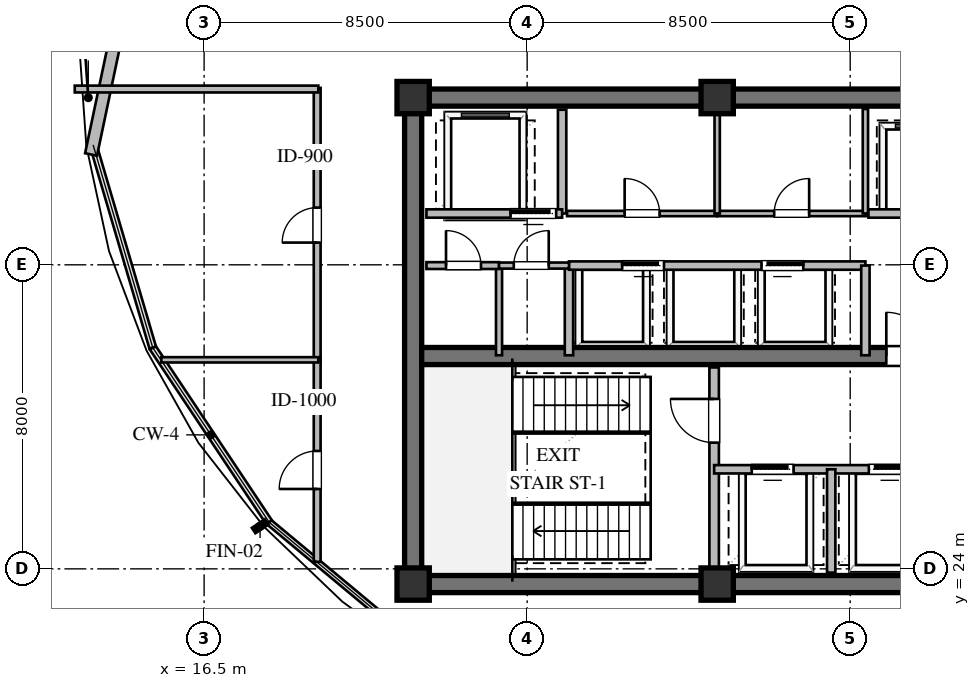
"""IFC4 building model, lengths in metres.
Left out: names, types, materials, properties, quantities, classifications, styles, units other than length and angle.
Written with IfcOpenShell. Run it as: python <this file> out.ifc"""

import sys

from ifc_helpers import new_model, si_unit, direction, frame, frame_2d, origin, origin_2d, place, context, subcontext, project, spatial, rectangle, extrude, element, fill, save


model = new_model("IFC4")
c1 = context("Model", 3, precision=1e-05, world=origin(), true_north=direction((0.0, 1.0)))
c2 = subcontext(c1, "Body", "Model", "MODEL_VIEW")
j1 = project(units=[si_unit("LENGTHUNIT", "METRE"), si_unit("PLANEANGLEUNIT", "RADIAN")], contexts=[c1])
p1 = place(None, origin())
s1 = spatial("IfcSite", under=j1, at=p1, CompositionType="ELEMENT")
p2 = place(p1, origin())
s2 = spatial("IfcBuilding", under=s1, at=p2, CompositionType="ELEMENT")
p3 = place(p2, frame((0.0, 0.0, 190.8)))
s3 = spatial("IfcBuildingStorey", under=s2, at=p3, CompositionType="ELEMENT", Elevation=190.8)
for number, where, z_axis, x_axis in (
    (1, (21.775, 23.6, 0.0), (0.0, 0.0, 1.0), (1.0, 0.0, 0.0)),
    (2, (21.775, 36.4, 0.0), (0.0, 0.0, 1.0), (1.0, 0.0, 0.0)),
):
    element("IfcWall", number, at=place(p3, frame(where, z_axis=z_axis, x_axis=x_axis)), inside=s3, PredefinedType="SHEAR", context=c2, shape_type="SweptSolid", body=[
        extrude(rectangle(XDim=22.45, YDim=0.45, at=frame_2d((11.225, 0.0))), origin(), (0.0, 0.0, 1.0), 4.56),
    ])
p4 = place(p3, frame((22.0, 23.825, 0.0), z_axis=(0.0, 0.0, 1.0), x_axis=(0.0, 1.0, 0.0)))
e3 = element("IfcWall", 3, at=p4, inside=s3, PredefinedType="SHEAR", context=c2, shape_type="SweptSolid", body=[
    extrude(rectangle(XDim=12.35, YDim=0.45, at=frame_2d((6.175, 0.0))), origin(), (0.0, 0.0, 1.0), 4.56),
])
p5 = place(p3, frame((22.225, 29.6, 0.0), z_axis=(0.0, 0.0, 1.0), x_axis=(1.0, 0.0, 0.0)))
e4 = element("IfcWall", 4, at=p5, inside=s3, PredefinedType="SHEAR", context=c2, shape_type="SweptSolid", body=[
    extrude(rectangle(XDim=21.55, YDim=0.45, at=frame_2d((10.775, 0.0))), origin(), (0.0, 0.0, 1.0), 4.56),
])
p6 = place(p5, frame((12.225, 0.0, 0.0)))
e5 = element("IfcOpeningElement", 5, at=p6, cuts=e4, PredefinedType="OPENING", context=c2, shape_type="SweptSolid", body=[
    extrude(rectangle(XDim=1.15, YDim=2.1, at=frame_2d((0.575, 1.05))), frame((0.0, 0.235, 0.0), z_axis=(0.0, -1.0, 0.0), x_axis=(1.0, 0.0, 0.0)), (0.0, 0.0, 1.0), 0.47),
])
for number, where, z_axis, x_axis in (
    (6, (22.0, 23.6, 0.0), (0.0, 0.0, 1.0), (1.0, 0.0, 0.0)),
    (7, (30.0, 23.6, 0.0), (0.0, 0.0, 1.0), (1.0, 0.0, 0.0)),
    (8, (30.0, 36.4, 0.0), (0.0, 0.0, 1.0), (1.0, 0.0, 0.0)),
    (9, (22.0, 36.4, 0.0), (0.0, 0.0, 1.0), (1.0, 0.0, 0.0)),
):
    element("IfcColumn", number, at=place(p3, frame(where, z_axis=z_axis, x_axis=x_axis)), inside=s3, PredefinedType="COLUMN", context=c2, shape_type="SweptSolid", body=[
        extrude(rectangle(XDim=0.85, YDim=0.85, at=origin_2d()), origin(), (0.0, 0.0, 1.0), 4.8),
    ])
p7 = place(p3, frame((13.525, 34.903, 0.0), z_axis=(0.0, 0.0, 1.0), x_axis=(0.206301080321, 0.978488561128, 0.0)))
e10 = element("IfcWall", 10, at=p7, inside=s3, PredefinedType="STANDARD", context=c2, shape_type="SweptSolid", body=[
    extrude(rectangle(XDim=14.819, YDim=0.32, at=frame_2d((7.409, 0.0))), origin(), (0.0, 0.0, 1.0), 4.006),
])
p8 = place(p3, frame((29.92, 23.9, 0.0), z_axis=(0.0, 0.0, 1.0), x_axis=(0.0, 1.0, 0.0)))
e11 = element("IfcWall", 11, at=p8, inside=s3, PredefinedType="SOLIDWALL", context=c2, shape_type="SweptSolid", body=[
    extrude(rectangle(XDim=5.4, YDim=0.25, at=frame_2d((2.7, 0.0))), origin(), (0.0, 0.0, 1.0), 4.56),
])
p9 = place(p8, frame((3.421, 0.0, 0.0)))
e12 = element("IfcOpeningElement", 12, at=p9, cuts=e11, PredefinedType="OPENING", context=c2, shape_type="SweptSolid", body=[
    extrude(rectangle(XDim=1.15, YDim=2.1, at=frame_2d((0.575, 1.05))), frame((0.0, 0.135, 0.0), z_axis=(0.0, -1.0, 0.0), x_axis=(1.0, 0.0, 0.0)), (0.0, 0.0, 1.0), 0.27),
])
p10 = place(p3, frame((29.92, 26.62, 0.0), z_axis=(0.0, 0.0, 1.0), x_axis=(1.0, 0.0, 0.0)))
e13 = element("IfcWall", 13, at=p10, inside=s3, PredefinedType="SOLIDWALL", context=c2, shape_type="SweptSolid", body=[
    extrude(rectangle(XDim=6.16, YDim=0.22, at=frame_2d((3.08, 0.0))), origin(), (0.0, 0.0, 1.0), 4.56),
])
p11 = place(p10, frame((0.99, 0.0, 0.0)))
e14 = element("IfcOpeningElement", 14, at=p11, cuts=e13, PredefinedType="OPENING", context=c2, shape_type="SweptSolid", body=[
    extrude(rectangle(XDim=1.1, YDim=2.1, at=frame_2d((0.55, 1.05))), frame((0.0, 0.12, 0.0), z_axis=(0.0, -1.0, 0.0), x_axis=(1.0, 0.0, 0.0)), (0.0, 0.0, 1.0), 0.24),
])
p12 = place(p10, frame((4.07, 0.0, 0.0)))
e15 = element("IfcOpeningElement", 15, at=p12, cuts=e13, PredefinedType="OPENING", context=c2, shape_type="SweptSolid", body=[
    extrude(rectangle(XDim=1.1, YDim=2.1, at=frame_2d((0.55, 1.05))), frame((0.0, 0.12, 0.0), z_axis=(0.0, -1.0, 0.0), x_axis=(1.0, 0.0, 0.0)), (0.0, 0.0, 1.0), 0.24),
])
p13 = place(p3, frame((33.0, 23.9, 0.0), z_axis=(0.0, 0.0, 1.0), x_axis=(0.0, 1.0, 0.0)))
e16 = element("IfcWall", 16, at=p13, inside=s3, PredefinedType="SOLIDWALL", context=c2, shape_type="SweptSolid", body=[
    extrude(rectangle(XDim=2.72, YDim=0.22, at=frame_2d((1.36, 0.0))), origin(), (0.0, 0.0, 1.0), 4.56),
])
p14 = place(p3, frame((25.92, 33.35, 0.0), z_axis=(0.0, 0.0, 1.0), x_axis=(0.0, 1.0, 0.0)))
e17 = element("IfcWall", 17, at=p14, inside=s3, PredefinedType="SOLIDWALL", context=c2, shape_type="SweptSolid", body=[
    extrude(rectangle(XDim=2.73, YDim=0.22, at=frame_2d((1.365, 0.0))), origin(), (0.0, 0.0, 1.0), 4.56),
])
p15 = place(p3, frame((22.35, 33.35, 0.0), z_axis=(0.0, 0.0, 1.0), x_axis=(1.0, 0.0, 0.0)))
e18 = element("IfcWall", 18, at=p15, inside=s3, PredefinedType="SOLIDWALL", context=c2, shape_type="SweptSolid", body=[
    extrude(rectangle(XDim=3.57, YDim=0.22, at=frame_2d((1.785, 0.0))), origin(), (0.0, 0.0, 1.0), 4.56),
])
p16 = place(p15, frame((2.213, 0.0, 0.0)))
e19 = element("IfcOpeningElement", 19, at=p16, cuts=e18, PredefinedType="OPENING", context=c2, shape_type="SweptSolid", body=[
    extrude(rectangle(XDim=1.2, YDim=2.1, at=frame_2d((0.6, 1.05))), frame((0.0, 0.12, 0.0), z_axis=(0.0, -1.0, 0.0), x_axis=(1.0, 0.0, 0.0)), (0.0, 0.0, 1.0), 0.24),
])
p17 = place(p3, frame((26.1, 29.62, 0.0), z_axis=(0.0, 0.0, 1.0), x_axis=(0.0, 1.0, 0.0)))
e20 = element("IfcWall", 20, at=p17, inside=s3, PredefinedType="SOLIDWALL", context=c2, shape_type="SweptSolid", body=[
    extrude(rectangle(XDim=2.36, YDim=0.22, at=frame_2d((1.18, 0.0))), origin(), (0.0, 0.0, 1.0), 4.56),
])
p18 = place(p3, frame((26.1, 31.98, 0.0), z_axis=(0.0, 0.0, 1.0), x_axis=(1.0, 0.0, 0.0)))
e21 = element("IfcWall", 21, at=p18, inside=s3, PredefinedType="SOLIDWALL", context=c2, shape_type="SweptSolid", body=[
    extrude(rectangle(XDim=7.8, YDim=0.22, at=frame_2d((3.9, 0.0))), origin(), (0.0, 0.0, 1.0), 4.56),
])
p19 = place(p18, frame((1.4, 0.0, 0.0)))
e22 = element("IfcOpeningElement", 22, at=p19, cuts=e21, PredefinedType="OPENING", context=c2, shape_type="SweptSolid", body=[
    extrude(rectangle(XDim=1.1, YDim=2.1, at=frame_2d((0.55, 1.05))), frame((0.0, 0.12, 0.0), z_axis=(0.0, -1.0, 0.0), x_axis=(1.0, 0.0, 0.0)), (0.0, 0.0, 1.0), 0.24),
])
p20 = place(p18, frame((5.066, 0.0, 0.0)))
e23 = element("IfcOpeningElement", 23, at=p20, cuts=e21, PredefinedType="OPENING", context=c2, shape_type="SweptSolid", body=[
    extrude(rectangle(XDim=1.1, YDim=2.1, at=frame_2d((0.55, 1.05))), frame((0.0, 0.12, 0.0), z_axis=(0.0, -1.0, 0.0), x_axis=(1.0, 0.0, 0.0)), (0.0, 0.0, 1.0), 0.24),
])
p21 = place(p3, frame((33.9, 29.62, 0.0), z_axis=(0.0, 0.0, 1.0), x_axis=(0.0, 1.0, 0.0)))
e24 = element("IfcWall", 24, at=p21, inside=s3, PredefinedType="SOLIDWALL", context=c2, shape_type="SweptSolid", body=[
    extrude(rectangle(XDim=2.36, YDim=0.22, at=frame_2d((1.18, 0.0))), origin(), (0.0, 0.0, 1.0), 4.56),
])
p22 = place(p3, frame((26.05, 33.35, 0.0), z_axis=(0.0, 0.0, 1.0), x_axis=(1.0, 0.0, 0.0)))
e25 = element("IfcWall", 25, at=p22, inside=s3, PredefinedType="PARTITIONING", context=c2, shape_type="SweptSolid", body=[
    extrude(rectangle(XDim=3.95, YDim=0.14, at=frame_2d((1.975, 0.0))), origin(), (0.0, 0.0, 1.0), 4.56),
])
p23 = place(p22, frame((1.515, 0.0, 0.0)))
e26 = element("IfcOpeningElement", 26, at=p23, cuts=e25, PredefinedType="OPENING", context=c2, shape_type="SweptSolid", body=[
    extrude(rectangle(XDim=0.92, YDim=2.1, at=frame_2d((0.46, 1.05))), frame((0.0, 0.08, 0.0), z_axis=(0.0, -1.0, 0.0), x_axis=(1.0, 0.0, 0.0)), (0.0, 0.0, 1.0), 0.16),
])
p24 = place(p3, frame((30.0, 33.35, 0.0), z_axis=(0.0, 0.0, 1.0), x_axis=(1.0, 0.0, 0.0)))
e27 = element("IfcWall", 27, at=p24, inside=s3, PredefinedType="PARTITIONING", context=c2, shape_type="SweptSolid", body=[
    extrude(rectangle(XDim=3.92, YDim=0.14, at=frame_2d((1.96, 0.0))), origin(), (0.0, 0.0, 1.0), 4.56),
])
p25 = place(p24, frame((1.5, 0.0, 0.0)))
e28 = element("IfcOpeningElement", 28, at=p25, cuts=e27, PredefinedType="OPENING", context=c2, shape_type="SweptSolid", body=[
    extrude(rectangle(XDim=0.92, YDim=2.1, at=frame_2d((0.46, 1.05))), frame((0.0, 0.08, 0.0), z_axis=(0.0, -1.0, 0.0), x_axis=(1.0, 0.0, 0.0)), (0.0, 0.0, 1.0), 0.16),
])
for number, where, z_axis, x_axis in (
    (29, (30.0, 33.35, 0.0), (0.0, 0.0, 1.0), (0.0, 1.0, 0.0)),
    (30, (33.9, 33.35, 0.0), (0.0, 0.0, 1.0), (0.0, 1.0, 0.0)),
):
    element("IfcWall", number, at=place(p3, frame(where, z_axis=z_axis, x_axis=x_axis)), inside=s3, PredefinedType="PARTITIONING", context=c2, shape_type="SweptSolid", body=[
        extrude(rectangle(XDim=2.75, YDim=0.14, at=frame_2d((1.375, 0.0))), origin(), (0.0, 0.0, 1.0), 4.56),
    ])
p26 = place(p3, frame((33.98, 33.35, 0.0), z_axis=(0.0, 0.0, 1.0), x_axis=(1.0, 0.0, 0.0)))
e31 = element("IfcWall", 31, at=p26, inside=s3, PredefinedType="SOLIDWALL", context=c2, shape_type="SweptSolid", body=[
    extrude(rectangle(XDim=7.54, YDim=0.22, at=frame_2d((3.77, 0.0))), origin(), (0.0, 0.0, 1.0), 4.56),
])
p27 = place(p26, frame((1.335, 0.0, 0.0)))
e32 = element("IfcOpeningElement", 32, at=p27, cuts=e31, PredefinedType="OPENING", context=c2, shape_type="SweptSolid", body=[
    extrude(rectangle(XDim=1.1, YDim=2.1, at=frame_2d((0.55, 1.05))), frame((0.0, 0.12, 0.0), z_axis=(0.0, -1.0, 0.0), x_axis=(1.0, 0.0, 0.0)), (0.0, 0.0, 1.0), 0.24),
])
p28 = place(p26, frame((4.879, 0.0, 0.0)))
e33 = element("IfcOpeningElement", 33, at=p28, cuts=e31, PredefinedType="OPENING", context=c2, shape_type="SweptSolid", body=[
    extrude(rectangle(XDim=1.1, YDim=2.1, at=frame_2d((0.55, 1.05))), frame((0.0, 0.12, 0.0), z_axis=(0.0, -1.0, 0.0), x_axis=(1.0, 0.0, 0.0)), (0.0, 0.0, 1.0), 0.24),
])
p29 = place(p3, frame((24.26, 29.62, 0.0), z_axis=(0.0, 0.0, 1.0), x_axis=(0.0, 1.0, 0.0)))
e34 = element("IfcWall", 34, at=p29, inside=s3, PredefinedType="PLUMBINGWALL", context=c2, shape_type="SweptSolid", body=[
    extrude(rectangle(XDim=2.36, YDim=0.16, at=frame_2d((1.18, 0.0))), origin(), (0.0, 0.0, 1.0), 1.887),
])
p30 = place(p3, frame((22.35, 31.98, 0.0), z_axis=(0.0, 0.0, 1.0), x_axis=(1.0, 0.0, 0.0)))
e35 = element("IfcWall", 35, at=p30, inside=s3, PredefinedType="PARTITIONING", context=c2, shape_type="SweptSolid", body=[
    extrude(rectangle(XDim=1.91, YDim=0.18, at=frame_2d((0.955, 0.0))), origin(), (0.0, 0.0, 1.0), 4.56),
])
p31 = place(p30, frame((0.515, 0.0, 0.0)))
e36 = element("IfcOpeningElement", 36, at=p31, cuts=e35, PredefinedType="OPENING", context=c2, shape_type="SweptSolid", body=[
    extrude(rectangle(XDim=0.92, YDim=2.1, at=frame_2d((0.46, 1.05))), frame((0.0, 0.1, 0.0), z_axis=(0.0, -1.0, 0.0), x_axis=(1.0, 0.0, 0.0)), (0.0, 0.0, 1.0), 0.2),
])
p32 = place(p3, frame((24.26, 31.98, 0.0), z_axis=(0.0, 0.0, 1.0), x_axis=(1.0, 0.0, 0.0)))
e37 = element("IfcWall", 37, at=p32, inside=s3, PredefinedType="PLUMBINGWALL", context=c2, shape_type="SweptSolid", body=[
    extrude(rectangle(XDim=1.84, YDim=0.16, at=frame_2d((0.92, 0.0))), origin(), (0.0, 0.0, 1.0), 4.56),
])
p33 = place(p32, frame((0.388, 0.0, 0.0)))
e38 = element("IfcOpeningElement", 38, at=p33, cuts=e37, PredefinedType="OPENING", context=c2, shape_type="SweptSolid", body=[
    extrude(rectangle(XDim=0.92, YDim=2.1, at=frame_2d((0.46, 1.05))), frame((0.0, 0.09, 0.0), z_axis=(0.0, -1.0, 0.0), x_axis=(1.0, 0.0, 0.0)), (0.0, 0.0, 1.0), 0.18),
])
p34 = place(p3, frame((19.475, 29.435, 0.0), z_axis=(0.0, 0.0, 1.0), x_axis=(0.0, 1.0, 0.0)))
e39 = element("IfcWall", 39, at=p34, inside=s3, PredefinedType="PARTITIONING", context=c2, shape_type="SweptSolid", body=[
    extrude(rectangle(XDim=7.22, YDim=0.18, at=frame_2d((3.61, 0.0))), origin(), (0.0, 0.0, 1.0), 4.56),
])
p35 = place(p34, frame((3.15, 0.0, 0.0)))
e40 = element("IfcOpeningElement", 40, at=p35, cuts=e39, PredefinedType="OPENING", context=c2, shape_type="SweptSolid", body=[
    extrude(rectangle(XDim=0.92, YDim=2.1, at=frame_2d((0.46, 1.05))), frame((0.0, 0.1, 0.0), z_axis=(0.0, -1.0, 0.0), x_axis=(1.0, 0.0, 0.0)), (0.0, 0.0, 1.0), 0.2),
])
p36 = place(p3, frame((19.505, 36.625, 0.0), z_axis=(0.0, 0.0, 1.0), x_axis=(-1.0, 0.0, 0.0)))
e41 = element("IfcWall", 41, at=p36, inside=s3, PredefinedType="PARTITIONING", context=c2, shape_type="SweptSolid", body=[
    extrude(rectangle(XDim=6.409, YDim=0.18, at=frame_2d((3.205, 0.0))), origin(), (0.0, 0.0, 1.0), 4.56),
])
p37 = place(p3, frame((19.475, 24.185, 0.0), z_axis=(0.0, 0.0, 1.0), x_axis=(0.0, 1.0, 0.0)))
e42 = element("IfcWall", 42, at=p37, inside=s3, PredefinedType="PARTITIONING", context=c2, shape_type="SweptSolid", body=[
    extrude(rectangle(XDim=5.38, YDim=0.18, at=frame_2d((2.69, 0.0))), origin(), (0.0, 0.0, 1.0), 4.017),
])
p38 = place(p37, frame((1.917, 0.0, 0.0)))
e43 = element("IfcOpeningElement", 43, at=p38, cuts=e42, PredefinedType="OPENING", context=c2, shape_type="SweptSolid", body=[
    extrude(rectangle(XDim=1.0, YDim=2.1, at=frame_2d((0.5, 1.05))), frame((0.0, 0.1, 0.0), z_axis=(0.0, -1.0, 0.0), x_axis=(1.0, 0.0, 0.0)), (0.0, 0.0, 1.0), 0.2),
])
p39 = place(p3, frame((19.505, 29.5, 0.0), z_axis=(0.0, 0.0, 1.0), x_axis=(-1.0, 0.0, 0.0)))
e44 = element("IfcWall", 44, at=p39, inside=s3, PredefinedType="PARTITIONING", context=c2, shape_type="SweptSolid", body=[
    extrude(rectangle(XDim=4.133, YDim=0.14, at=frame_2d((2.066, 0.0))), origin(), (0.0, 0.0, 1.0), 4.56),
])
p40 = place(p9, origin())
e45 = element("IfcDoor", 45, at=p40, inside=s3, OperationType="SINGLE_SWING_RIGHT", PredefinedType="DOOR", context=c2, shape_type="SweptSolid", body=[
    extrude(rectangle(XDim=1.15, YDim=2.1, at=frame_2d((0.575, 1.05))), frame((0.0, 0.025, 0.0), z_axis=(0.0, -1.0, 0.0), x_axis=(1.0, 0.0, 0.0)), (0.0, 0.0, 1.0), 0.05),
])
fill(e12, e45)
p41 = place(p11, origin())
e46 = element("IfcDoor", 46, at=p41, inside=s3, OperationType="SLIDING_TO_LEFT", PredefinedType="DOOR", context=c2, shape_type="SweptSolid", body=[
    extrude(rectangle(XDim=1.1, YDim=2.1, at=frame_2d((0.55, 1.05))), frame((0.0, 0.025, 0.0), z_axis=(0.0, -1.0, 0.0), x_axis=(1.0, 0.0, 0.0)), (0.0, 0.0, 1.0), 0.05),
])
fill(e14, e46)
p42 = place(p12, origin())
e47 = element("IfcDoor", 47, at=p42, inside=s3, OperationType="SLIDING_TO_RIGHT", PredefinedType="DOOR", context=c2, shape_type="SweptSolid", body=[
    extrude(rectangle(XDim=1.1, YDim=2.1, at=frame_2d((0.55, 1.05))), frame((0.0, 0.025, 0.0), z_axis=(0.0, -1.0, 0.0), x_axis=(1.0, 0.0, 0.0)), (0.0, 0.0, 1.0), 0.05),
])
fill(e15, e47)
p43 = place(p6, origin())
e48 = element("IfcDoor", 48, at=p43, inside=s3, OperationType="SINGLE_SWING_LEFT", PredefinedType="DOOR", context=c2, shape_type="SweptSolid", body=[
    extrude(rectangle(XDim=1.15, YDim=2.1, at=frame_2d((0.575, 1.05))), frame((0.0, 0.025, 0.0), z_axis=(0.0, -1.0, 0.0), x_axis=(1.0, 0.0, 0.0)), (0.0, 0.0, 1.0), 0.05),
])
fill(e5, e48)
p44 = place(p16, origin())
e49 = element("IfcDoor", 49, at=p44, inside=s3, OperationType="SLIDING_TO_LEFT", PredefinedType="DOOR", context=c2, shape_type="SweptSolid", body=[
    extrude(rectangle(XDim=1.2, YDim=2.1, at=frame_2d((0.6, 1.05))), frame((0.0, 0.025, 0.0), z_axis=(0.0, -1.0, 0.0), x_axis=(1.0, 0.0, 0.0)), (0.0, 0.0, 1.0), 0.05),
])
fill(e19, e49)
p45 = place(p19, origin())
e50 = element("IfcDoor", 50, at=p45, inside=s3, OperationType="SLIDING_TO_LEFT", PredefinedType="DOOR", context=c2, shape_type="SweptSolid", body=[
    extrude(rectangle(XDim=1.1, YDim=2.1, at=frame_2d((0.55, 1.05))), frame((0.0, 0.025, 0.0), z_axis=(0.0, -1.0, 0.0), x_axis=(1.0, 0.0, 0.0)), (0.0, 0.0, 1.0), 0.05),
])
fill(e22, e50)
p46 = place(p20, origin())
e51 = element("IfcDoor", 51, at=p46, inside=s3, OperationType="SLIDING_TO_RIGHT", PredefinedType="DOOR", context=c2, shape_type="SweptSolid", body=[
    extrude(rectangle(XDim=1.1, YDim=2.1, at=frame_2d((0.55, 1.05))), frame((0.0, 0.025, 0.0), z_axis=(0.0, -1.0, 0.0), x_axis=(1.0, 0.0, 0.0)), (0.0, 0.0, 1.0), 0.05),
])
fill(e23, e51)
p47 = place(p23, origin())
e52 = element("IfcDoor", 52, at=p47, inside=s3, OperationType="SINGLE_SWING_LEFT", PredefinedType="DOOR", context=c2, shape_type="SweptSolid", body=[
    extrude(rectangle(XDim=0.92, YDim=2.1, at=frame_2d((0.46, 1.05))), frame((0.0, 0.025, 0.0), z_axis=(0.0, -1.0, 0.0), x_axis=(1.0, 0.0, 0.0)), (0.0, 0.0, 1.0), 0.05),
])
fill(e26, e52)
p48 = place(p25, origin())
e53 = element("IfcDoor", 53, at=p48, inside=s3, OperationType="SINGLE_SWING_RIGHT", PredefinedType="DOOR", context=c2, shape_type="SweptSolid", body=[
    extrude(rectangle(XDim=0.92, YDim=2.1, at=frame_2d((0.46, 1.05))), frame((0.0, 0.025, 0.0), z_axis=(0.0, -1.0, 0.0), x_axis=(1.0, 0.0, 0.0)), (0.0, 0.0, 1.0), 0.05),
])
fill(e28, e53)
p49 = place(p31, origin())
e54 = element("IfcDoor", 54, at=p49, inside=s3, OperationType="SINGLE_SWING_LEFT", PredefinedType="DOOR", context=c2, shape_type="SweptSolid", body=[
    extrude(rectangle(XDim=0.92, YDim=2.1, at=frame_2d((0.46, 1.05))), frame((0.0, 0.025, 0.0), z_axis=(0.0, -1.0, 0.0), x_axis=(1.0, 0.0, 0.0)), (0.0, 0.0, 1.0), 0.05),
])
fill(e36, e54)
p50 = place(p33, origin())
e55 = element("IfcDoor", 55, at=p50, inside=s3, OperationType="SINGLE_SWING_RIGHT", PredefinedType="DOOR", context=c2, shape_type="SweptSolid", body=[
    extrude(rectangle(XDim=0.92, YDim=2.1, at=frame_2d((0.46, 1.05))), frame((0.0, 0.025, 0.0), z_axis=(0.0, -1.0, 0.0), x_axis=(1.0, 0.0, 0.0)), (0.0, 0.0, 1.0), 0.05),
])
fill(e38, e55)
p51 = place(p35, origin())
e56 = element("IfcDoor", 56, at=p51, inside=s3, OperationType="SINGLE_SWING_LEFT", PredefinedType="DOOR", context=c2, shape_type="SweptSolid", body=[
    extrude(rectangle(XDim=0.92, YDim=2.1, at=frame_2d((0.46, 1.05))), frame((0.0, 0.025, 0.0), z_axis=(0.0, -1.0, 0.0), x_axis=(1.0, 0.0, 0.0)), (0.0, 0.0, 1.0), 0.05),
])
fill(e40, e56)
p52 = place(p38, origin())
e57 = element("IfcDoor", 57, at=p52, inside=s3, OperationType="SINGLE_SWING_LEFT", PredefinedType="DOOR", context=c2, shape_type="SweptSolid", body=[
    extrude(rectangle(XDim=1.0, YDim=2.1, at=frame_2d((0.5, 1.05))), frame((0.0, 0.025, 0.0), z_axis=(0.0, -1.0, 0.0), x_axis=(1.0, 0.0, 0.0)), (0.0, 0.0, 1.0), 0.05),
])
fill(e43, e57)
save(model, sys.argv[1])
